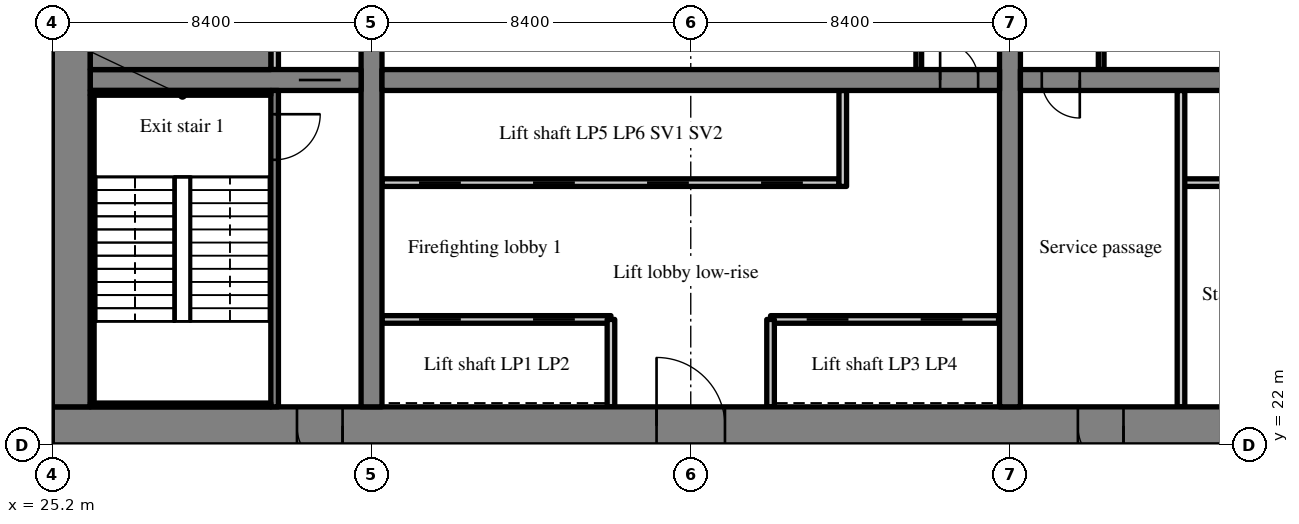
"""IFC4 building model, lengths in metres.
Left out: names, types, materials, properties, quantities, classifications, styles, units other than length and angle.
Written with IfcOpenShell. Run it as: python <this file> out.ifc"""

import sys

from ifc_helpers import new_model, si_unit, direction, frame, frame_2d, origin, place, context, subcontext, project, spatial, rectangle, extrude, source, transform, mapped, element, fill, save


model = new_model("IFC4")
c1 = context("Model", 3, precision=1e-05, world=origin(), true_north=direction((0.0, 1.0)))
c2 = subcontext(c1, "Body", "Model", "MODEL_VIEW")
j1 = project(units=[si_unit("LENGTHUNIT", "METRE"), si_unit("PLANEANGLEUNIT", "RADIAN")], contexts=[c1])
p1 = place(None, origin())
s1 = spatial("IfcSite", under=j1, at=p1, CompositionType="ELEMENT")
p2 = place(p1, origin())
s2 = spatial("IfcBuilding", under=s1, at=p2, CompositionType="ELEMENT")
p3 = place(p2, frame((0.0, 0.0, 46.8)))
s3 = spatial("IfcBuildingStorey", under=s2, at=p3, CompositionType="ELEMENT", Elevation=46.8)
m1 = source(origin(), c2, "Body", "SweptSolid", [
    extrude(rectangle(XDim=50.4, YDim=1.0, at=frame_2d((25.2, 0.0))), origin(), (0.0, 0.0, 1.0), 3.52),
])
p4 = place(p3, frame((25.2, 22.5, 0.0), z_axis=(0.0, 0.0, 1.0), x_axis=(1.0, 0.0, 0.0)))
e1 = element("IfcWall", 1, at=p4, inside=s3, PredefinedType="SHEAR", context=c2, shape_type="MappedRepresentation", body=[
    mapped(m1, transform((0.0, 0.0, 0.0), scale=1.0)),
])
m2 = source(origin(), c2, "Body", "SweptSolid", [
    extrude(rectangle(XDim=1.8, YDim=2.1, at=frame_2d((0.9, 1.05))), frame((0.0, 0.51, 0.0), z_axis=(0.0, -1.0, 0.0), x_axis=(1.0, 0.0, 0.0)), (0.0, 0.0, 1.0), 1.02),
])
p5 = place(p4, frame((15.9, 0.0, 0.0)))
e2 = element("IfcOpeningElement", 2, at=p5, cuts=e1, PredefinedType="OPENING", context=c2, shape_type="MappedRepresentation", body=[
    mapped(m2, transform((0.0, 0.0, 0.0), scale=1.0)),
])
m3 = source(origin(), c2, "Body", "SweptSolid", [
    extrude(rectangle(XDim=1.2, YDim=2.1, at=frame_2d((0.6, 1.05))), frame((0.0, 0.51, 0.0), z_axis=(0.0, -1.0, 0.0), x_axis=(1.0, 0.0, 0.0)), (0.0, 0.0, 1.0), 1.02),
])
p6 = place(p4, frame((26.987, 0.0, 0.0)))
e3 = element("IfcOpeningElement", 3, at=p6, cuts=e1, PredefinedType="OPENING", context=c2, shape_type="MappedRepresentation", body=[
    mapped(m3, transform((0.0, 0.0, 0.0), scale=1.0)),
])
m4 = source(origin(), c2, "Body", "SweptSolid", [
    extrude(rectangle(XDim=0.9, YDim=2.1, at=frame_2d((0.45, 1.05))), frame((0.0, 0.51, 0.0), z_axis=(0.0, -1.0, 0.0), x_axis=(1.0, 0.0, 0.0)), (0.0, 0.0, 1.0), 1.02),
])
p7 = place(p4, frame((33.75, 0.0, 0.0)))
e4 = element("IfcOpeningElement", 4, at=p7, cuts=e1, PredefinedType="OPENING", context=c2, shape_type="MappedRepresentation", body=[
    mapped(m4, transform((0.0, 0.0, 0.0), scale=1.0)),
])
p8 = place(p4, frame((30.75, 0.0, 0.0)))
e5 = element("IfcOpeningElement", 5, at=p8, cuts=e1, PredefinedType="OPENING", context=c2, shape_type="MappedRepresentation", body=[
    mapped(m4, transform((0.0, 0.0, 0.0), scale=1.0)),
])
p9 = place(p4, frame((38.262, 0.0, 0.0)))
e6 = element("IfcOpeningElement", 6, at=p9, cuts=e1, PredefinedType="OPENING", context=c2, shape_type="MappedRepresentation", body=[
    mapped(m4, transform((0.0, 0.0, 0.0), scale=1.0)),
])
p10 = place(p4, frame((6.438, 0.0, 0.0)))
e7 = element("IfcOpeningElement", 7, at=p10, cuts=e1, PredefinedType="OPENING", context=c2, shape_type="MappedRepresentation", body=[
    mapped(m3, transform((0.0, 0.0, 0.0), scale=1.0)),
])
p11 = place(p4, frame((47.725, 0.0, 0.0)))
e8 = element("IfcOpeningElement", 8, at=p11, cuts=e1, PredefinedType="OPENING", context=c2, shape_type="MappedRepresentation", body=[
    mapped(m3, transform((0.0, 0.0, 0.0), scale=1.0)),
])
m5 = source(origin(), c2, "Body", "SweptSolid", [
    extrude(rectangle(XDim=18.0, YDim=1.0, at=frame_2d((9.0, 0.0))), origin(), (0.0, 0.0, 1.0), 3.52),
])
p12 = place(p3, frame((25.7, 23.0, 0.0), z_axis=(0.0, 0.0, 1.0), x_axis=(0.0, 1.0, 0.0)))
e9 = element("IfcWall", 9, at=p12, inside=s3, PredefinedType="SHEAR", context=c2, shape_type="MappedRepresentation", body=[
    mapped(m5, transform((0.0, 0.0, 0.0), scale=1.0)),
])
m6 = source(origin(), c2, "Body", "SweptSolid", [
    extrude(rectangle(XDim=18.0, YDim=0.55, at=frame_2d((9.0, 0.0))), origin(), (0.0, 0.0, 1.0), 3.52),
])
p13 = place(p3, frame((33.6, 23.0, 0.0), z_axis=(0.0, 0.0, 1.0), x_axis=(0.0, 1.0, 0.0)))
e10 = element("IfcWall", 10, at=p13, inside=s3, PredefinedType="SHEAR", context=c2, shape_type="MappedRepresentation", body=[
    mapped(m6, transform((0.0, 0.0, 0.0), scale=1.0)),
])
m7 = source(origin(), c2, "Body", "SweptSolid", [
    extrude(rectangle(XDim=1.1, YDim=2.1, at=frame_2d((0.55, 1.05))), frame((0.0, 0.285, 0.0), z_axis=(0.0, -1.0, 0.0), x_axis=(1.0, 0.0, 0.0)), (0.0, 0.0, 1.0), 0.57),
])
p14 = place(p13, frame((12.45, 0.0, 0.0)))
e11 = element("IfcOpeningElement", 11, at=p14, cuts=e10, PredefinedType="OPENING", context=c2, shape_type="MappedRepresentation", body=[
    mapped(m7, transform((0.0, 0.0, 0.0), scale=1.0)),
])
p15 = place(p3, frame((50.4, 23.0, 0.0), z_axis=(0.0, 0.0, 1.0), x_axis=(0.0, 1.0, 0.0)))
e12 = element("IfcWall", 12, at=p15, inside=s3, PredefinedType="SHEAR", context=c2, shape_type="MappedRepresentation", body=[
    mapped(m6, transform((0.0, 0.0, 0.0), scale=1.0)),
])
p16 = place(p15, frame((12.45, 0.0, 0.0)))
e13 = element("IfcOpeningElement", 13, at=p16, cuts=e12, PredefinedType="OPENING", context=c2, shape_type="MappedRepresentation", body=[
    mapped(m7, transform((0.0, 0.0, 0.0), scale=1.0)),
])
m8 = source(origin(), c2, "Body", "SweptSolid", [
    extrude(rectangle(XDim=7.125, YDim=0.55, at=frame_2d((3.562, 0.0))), origin(), (0.0, 0.0, 1.0), 3.52),
])
p17 = place(p3, frame((26.2, 31.6, 0.0), z_axis=(0.0, 0.0, 1.0), x_axis=(1.0, 0.0, 0.0)))
e14 = element("IfcWall", 14, at=p17, inside=s3, PredefinedType="SHEAR", context=c2, shape_type="MappedRepresentation", body=[
    mapped(m8, transform((0.0, 0.0, 0.0), scale=1.0)),
])
p18 = place(p17, frame((5.488, 0.0, 0.0)))
e15 = element("IfcOpeningElement", 15, at=p18, cuts=e14, PredefinedType="OPENING", context=c2, shape_type="MappedRepresentation", body=[
    mapped(m7, transform((0.0, 0.0, 0.0), scale=1.0)),
])
m9 = source(origin(), c2, "Body", "SweptSolid", [
    extrude(rectangle(XDim=16.25, YDim=0.55, at=frame_2d((8.125, 0.0))), origin(), (0.0, 0.0, 1.0), 3.52),
])
p19 = place(p3, frame((33.875, 31.6, 0.0), z_axis=(0.0, 0.0, 1.0), x_axis=(1.0, 0.0, 0.0)))
e16 = element("IfcWall", 16, at=p19, inside=s3, PredefinedType="SHEAR", context=c2, shape_type="MappedRepresentation", body=[
    mapped(m9, transform((0.0, 0.0, 0.0), scale=1.0)),
])
m10 = source(origin(), c2, "Body", "SweptSolid", [
    extrude(rectangle(XDim=1.0, YDim=2.1, at=frame_2d((0.5, 1.05))), frame((0.0, 0.285, 0.0), z_axis=(0.0, -1.0, 0.0), x_axis=(1.0, 0.0, 0.0)), (0.0, 0.0, 1.0), 0.57),
])
p20 = place(p19, frame((14.687, 0.0, 0.0)))
e17 = element("IfcOpeningElement", 17, at=p20, cuts=e16, PredefinedType="OPENING", context=c2, shape_type="MappedRepresentation", body=[
    mapped(m10, transform((0.0, 0.0, 0.0), scale=1.0)),
])
p21 = place(p3, frame((50.675, 31.6, 0.0), z_axis=(0.0, 0.0, 1.0), x_axis=(1.0, 0.0, 0.0)))
e18 = element("IfcWall", 18, at=p21, inside=s3, PredefinedType="SHEAR", context=c2, shape_type="MappedRepresentation", body=[
    mapped(m9, transform((0.0, 0.0, 0.0), scale=1.0)),
])
p22 = place(p21, frame((0.562, 0.0, 0.0)))
e19 = element("IfcOpeningElement", 19, at=p22, cuts=e18, PredefinedType="OPENING", context=c2, shape_type="MappedRepresentation", body=[
    mapped(m10, transform((0.0, 0.0, 0.0), scale=1.0)),
])
m11 = source(origin(), c2, "Body", "SweptSolid", [
    extrude(rectangle(XDim=6.025, YDim=0.2, at=frame_2d((3.012, 0.0))), origin(), (0.0, 0.0, 1.0), 3.52),
])
p23 = place(p3, frame((33.875, 25.3, 0.0), z_axis=(0.0, 0.0, 1.0), x_axis=(1.0, 0.0, 0.0)))
e20 = element("IfcWall", 20, at=p23, inside=s3, PredefinedType="SOLIDWALL", context=c2, shape_type="MappedRepresentation", body=[
    mapped(m11, transform((0.0, 0.0, 0.0), scale=1.0)),
])
m12 = source(origin(), c2, "Body", "SweptSolid", [
    extrude(rectangle(XDim=1.1, YDim=2.1, at=frame_2d((0.55, 1.05))), frame((0.0, 0.11, 0.0), z_axis=(0.0, -1.0, 0.0), x_axis=(1.0, 0.0, 0.0)), (0.0, 0.0, 1.0), 0.22),
])
p24 = place(p23, frame((0.975, 0.0, 0.0)))
e21 = element("IfcOpeningElement", 21, at=p24, cuts=e20, PredefinedType="OPENING", context=c2, shape_type="MappedRepresentation", body=[
    mapped(m12, transform((0.0, 0.0, 0.0), scale=1.0)),
])
p25 = place(p23, frame((3.975, 0.0, 0.0)))
e22 = element("IfcOpeningElement", 22, at=p25, cuts=e20, PredefinedType="OPENING", context=c2, shape_type="MappedRepresentation", body=[
    mapped(m12, transform((0.0, 0.0, 0.0), scale=1.0)),
])
m13 = source(origin(), c2, "Body", "SweptSolid", [
    extrude(rectangle(XDim=6.0, YDim=0.2, at=frame_2d((3.0, 0.0))), origin(), (0.0, 0.0, 1.0), 3.52),
])
p26 = place(p3, frame((44.1, 25.3, 0.0), z_axis=(0.0, 0.0, 1.0), x_axis=(1.0, 0.0, 0.0)))
e23 = element("IfcWall", 23, at=p26, inside=s3, PredefinedType="SOLIDWALL", context=c2, shape_type="MappedRepresentation", body=[
    mapped(m13, transform((0.0, 0.0, 0.0), scale=1.0)),
])
p27 = place(p26, frame((0.95, 0.0, 0.0)))
e24 = element("IfcOpeningElement", 24, at=p27, cuts=e23, PredefinedType="OPENING", context=c2, shape_type="MappedRepresentation", body=[
    mapped(m12, transform((0.0, 0.0, 0.0), scale=1.0)),
])
p28 = place(p26, frame((3.95, 0.0, 0.0)))
e25 = element("IfcOpeningElement", 25, at=p28, cuts=e23, PredefinedType="OPENING", context=c2, shape_type="MappedRepresentation", body=[
    mapped(m12, transform((0.0, 0.0, 0.0), scale=1.0)),
])
m14 = source(origin(), c2, "Body", "SweptSolid", [
    extrude(rectangle(XDim=12.025, YDim=0.2, at=frame_2d((6.012, 0.0))), origin(), (0.0, 0.0, 1.0), 3.52),
])
p29 = place(p3, frame((33.875, 28.9, 0.0), z_axis=(0.0, 0.0, 1.0), x_axis=(1.0, 0.0, 0.0)))
e26 = element("IfcWall", 26, at=p29, inside=s3, PredefinedType="SOLIDWALL", context=c2, shape_type="MappedRepresentation", body=[
    mapped(m14, transform((0.0, 0.0, 0.0), scale=1.0)),
])
p30 = place(p29, frame((0.975, 0.0, 0.0)))
e27 = element("IfcOpeningElement", 27, at=p30, cuts=e26, PredefinedType="OPENING", context=c2, shape_type="MappedRepresentation", body=[
    mapped(m12, transform((0.0, 0.0, 0.0), scale=1.0)),
])
p31 = place(p29, frame((3.975, 0.0, 0.0)))
e28 = element("IfcOpeningElement", 28, at=p31, cuts=e26, PredefinedType="OPENING", context=c2, shape_type="MappedRepresentation", body=[
    mapped(m12, transform((0.0, 0.0, 0.0), scale=1.0)),
])
p32 = place(p29, frame((6.975, 0.0, 0.0)))
e29 = element("IfcOpeningElement", 29, at=p32, cuts=e26, PredefinedType="OPENING", context=c2, shape_type="MappedRepresentation", body=[
    mapped(m12, transform((0.0, 0.0, 0.0), scale=1.0)),
])
p33 = place(p29, frame((9.975, 0.0, 0.0)))
e30 = element("IfcOpeningElement", 30, at=p33, cuts=e26, PredefinedType="OPENING", context=c2, shape_type="MappedRepresentation", body=[
    mapped(m12, transform((0.0, 0.0, 0.0), scale=1.0)),
])
m15 = source(origin(), c2, "Body", "SweptSolid", [
    extrude(rectangle(XDim=2.3, YDim=0.2, at=frame_2d((1.15, 0.0))), origin(), (0.0, 0.0, 1.0), 3.52),
])
for number, where, z_axis, x_axis in (
    (31, (39.9, 23.0, 0.0), (0.0, 0.0, 1.0), (0.0, 1.0, 0.0)),
    (32, (44.1, 23.0, 0.0), (0.0, 0.0, 1.0), (0.0, 1.0, 0.0)),
):
    element("IfcWall", number, at=place(p3, frame(where, z_axis=z_axis, x_axis=x_axis)), inside=s3, PredefinedType="SOLIDWALL", context=c2, shape_type="MappedRepresentation", body=[
        mapped(m15, transform((0.0, 0.0, 0.0), scale=1.0)),
    ])
m16 = source(origin(), c2, "Body", "SweptSolid", [
    extrude(rectangle(XDim=2.525, YDim=0.2, at=frame_2d((1.262, 0.0))), origin(), (0.0, 0.0, 1.0), 3.52),
])
p34 = place(p3, frame((46.0, 28.8, 0.0), z_axis=(0.0, 0.0, 1.0), x_axis=(0.0, 1.0, 0.0)))
e33 = element("IfcWall", 33, at=p34, inside=s3, PredefinedType="SOLIDWALL", context=c2, shape_type="MappedRepresentation", body=[
    mapped(m16, transform((0.0, 0.0, 0.0), scale=1.0)),
])
m17 = source(origin(), c2, "Body", "SweptSolid", [
    extrude(rectangle(XDim=3.125, YDim=0.15, at=frame_2d((1.562, 0.0))), origin(), (0.0, 0.0, 1.0), 3.52),
])
p35 = place(p3, frame((48.0, 31.875, 0.0), z_axis=(0.0, 0.0, 1.0), x_axis=(0.0, 1.0, 0.0)))
e34 = element("IfcWall", 34, at=p35, inside=s3, PredefinedType="PARTITIONING", context=c2, shape_type="MappedRepresentation", body=[
    mapped(m17, transform((0.0, 0.0, 0.0), scale=1.0)),
])
p36 = place(p3, frame((60.9, 28.9, 0.0), z_axis=(0.0, 0.0, 1.0), x_axis=(-1.0, 0.0, 0.0)))
e35 = element("IfcWall", 35, at=p36, inside=s3, PredefinedType="SOLIDWALL", context=c2, shape_type="MappedRepresentation", body=[
    mapped(m13, transform((0.0, 0.0, 0.0), scale=1.0)),
])
m18 = source(origin(), c2, "Body", "SweptSolid", [
    extrude(rectangle(XDim=8.325, YDim=0.2, at=frame_2d((4.163, 0.0))), origin(), (0.0, 0.0, 1.0), 3.52),
])
p37 = place(p3, frame((54.9, 23.0, 0.0), z_axis=(0.0, 0.0, 1.0), x_axis=(0.0, 1.0, 0.0)))
e36 = element("IfcWall", 36, at=p37, inside=s3, PredefinedType="PARTITIONING", context=c2, shape_type="MappedRepresentation", body=[
    mapped(m18, transform((0.0, 0.0, 0.0), scale=1.0)),
])
p38 = place(p3, frame((52.8, 31.875, 0.0), z_axis=(0.0, 0.0, 1.0), x_axis=(0.0, 1.0, 0.0)))
e37 = element("IfcWall", 37, at=p38, inside=s3, PredefinedType="PARTITIONING", context=c2, shape_type="MappedRepresentation", body=[
    mapped(m17, transform((0.0, 0.0, 0.0), scale=1.0)),
])
m19 = source(origin(), c2, "Body", "SweptSolid", [
    extrude(rectangle(XDim=8.325, YDim=0.2, at=frame_2d((4.163, 0.0))), origin(), (0.0, 0.0, 1.0), 3.52),
])
p39 = place(p3, frame((31.05, 23.0, 0.0), z_axis=(0.0, 0.0, 1.0), x_axis=(0.0, 1.0, 0.0)))
e38 = element("IfcWall", 38, at=p39, inside=s3, PredefinedType="SOLIDWALL", context=c2, shape_type="MappedRepresentation", body=[
    mapped(m19, transform((0.0, 0.0, 0.0), scale=1.0)),
])
m20 = source(origin(), c2, "Body", "SweptSolid", [
    extrude(rectangle(XDim=1.2, YDim=2.1, at=frame_2d((0.6, 1.05))), frame((0.0, 0.11, 0.0), z_axis=(0.0, -1.0, 0.0), x_axis=(1.0, 0.0, 0.0)), (0.0, 0.0, 1.0), 0.22),
])
p40 = place(p39, frame((6.5, 0.0, 0.0)))
e39 = element("IfcOpeningElement", 39, at=p40, cuts=e38, PredefinedType="OPENING", context=c2, shape_type="MappedRepresentation", body=[
    mapped(m20, transform((0.0, 0.0, 0.0), scale=1.0)),
])
m21 = source(origin(), c2, "Body", "SweptSolid", [
    extrude(rectangle(XDim=1.725, YDim=0.2, at=frame_2d((0.863, 0.0))), origin(), (0.0, 0.0, 1.0), 3.52),
])
p41 = place(p3, frame((31.05, 31.875, 0.0), z_axis=(0.0, 0.0, 1.0), x_axis=(0.0, 1.0, 0.0)))
e40 = element("IfcWall", 40, at=p41, inside=s3, PredefinedType="SOLIDWALL", context=c2, shape_type="MappedRepresentation", body=[
    mapped(m21, transform((0.0, 0.0, 0.0), scale=1.0)),
])
m22 = source(origin(), c2, "Body", "SweptSolid", [
    extrude(rectangle(XDim=8.2, YDim=0.2, at=frame_2d((4.1, 0.0))), origin(), (0.0, 0.0, 1.0), 3.52),
])
p42 = place(p3, frame((17.0, 22.1, 0.0), z_axis=(0.0, 0.0, 1.0), x_axis=(1.0, 0.0, 0.0)))
e41 = element("IfcWall", 41, at=p42, inside=s3, PredefinedType="SOLIDWALL", context=c2, shape_type="MappedRepresentation", body=[
    mapped(m22, transform((0.0, 0.0, 0.0), scale=1.0)),
])
p43 = place(p42, frame((6.0, 0.0, 0.0)))
e42 = element("IfcOpeningElement", 42, at=p43, cuts=e41, PredefinedType="OPENING", context=c2, shape_type="MappedRepresentation", body=[
    mapped(m20, transform((0.0, 0.0, 0.0), scale=1.0)),
])
p44 = place(p3, frame((17.0, 30.4, 0.0), z_axis=(0.0, 0.0, 1.0), x_axis=(1.0, 0.0, 0.0)))
e43 = element("IfcWall", 43, at=p44, inside=s3, PredefinedType="SOLIDWALL", context=c2, shape_type="MappedRepresentation", body=[
    mapped(m22, transform((0.0, 0.0, 0.0), scale=1.0)),
])
m23 = source(origin(), c2, "Body", "SweptSolid", [
    extrude(rectangle(XDim=1.0, YDim=2.1, at=frame_2d((0.5, 1.05))), frame((0.0, 0.11, 0.0), z_axis=(0.0, -1.0, 0.0), x_axis=(1.0, 0.0, 0.0)), (0.0, 0.0, 1.0), 0.22),
])
p45 = place(p44, frame((6.1, 0.0, 0.0)))
e44 = element("IfcOpeningElement", 44, at=p45, cuts=e43, PredefinedType="OPENING", context=c2, shape_type="MappedRepresentation", body=[
    mapped(m23, transform((0.0, 0.0, 0.0), scale=1.0)),
])
m24 = source(origin(), c2, "Body", "SweptSolid", [
    extrude(rectangle(XDim=4.75, YDim=0.1, at=frame_2d((2.375, 0.0))), origin(), (0.0, 0.0, 1.0), 3.52),
])
p46 = place(p3, frame((26.2, 23.05, 0.0), z_axis=(0.0, 0.0, 1.0), x_axis=(1.0, 0.0, 0.0)))
e45 = element("IfcWall", 45, at=p46, inside=s3, PredefinedType="SOLIDWALL", context=c2, shape_type="MappedRepresentation", body=[
    mapped(m24, transform((0.0, 0.0, 0.0), scale=1.0)),
])
m25 = source(origin(), c2, "Body", "SweptSolid", [
    extrude(rectangle(XDim=4.75, YDim=0.125, at=frame_2d((2.375, 0.0))), origin(), (0.0, 0.0, 1.0), 3.52),
])
p47 = place(p3, frame((26.2, 31.262, 0.0), z_axis=(0.0, 0.0, 1.0), x_axis=(1.0, 0.0, 0.0)))
e46 = element("IfcWall", 46, at=p47, inside=s3, PredefinedType="SOLIDWALL", context=c2, shape_type="MappedRepresentation", body=[
    mapped(m25, transform((0.0, 0.0, 0.0), scale=1.0)),
])
m26 = source(origin(), c2, "Body", "SweptSolid", [
    extrude(rectangle(XDim=8.1, YDim=0.1, at=frame_2d((4.05, 0.0))), origin(), (0.0, 0.0, 1.0), 3.52),
])
p48 = place(p3, frame((26.25, 23.1, 0.0), z_axis=(0.0, 0.0, 1.0), x_axis=(0.0, 1.0, 0.0)))
e47 = element("IfcWall", 47, at=p48, inside=s3, PredefinedType="SOLIDWALL", context=c2, shape_type="MappedRepresentation", body=[
    mapped(m26, transform((0.0, 0.0, 0.0), scale=1.0)),
])
m27 = source(origin(), c2, "Body", "SweptSolid", [
    extrude(rectangle(XDim=4.75, YDim=0.925, at=frame_2d((2.375, 0.0))), origin(), (0.0, 0.0, 1.0), 3.52),
])
p49 = place(p3, frame((26.2, 32.337, 0.0), z_axis=(0.0, 0.0, 1.0), x_axis=(1.0, 0.0, 0.0)))
e48 = element("IfcWall", 48, at=p49, inside=s3, PredefinedType="SOLIDWALL", context=c2, shape_type="MappedRepresentation", body=[
    mapped(m27, transform((0.0, 0.0, 0.0), scale=1.0)),
])
m28 = source(origin(), c2, "Body", "SweptSolid", [
    extrude(rectangle(XDim=1.8, YDim=2.1, at=frame_2d((0.9, 1.05))), frame((0.0, 0.375, 0.0), z_axis=(0.0, -1.0, 0.0), x_axis=(1.0, 0.0, 0.0)), (0.0, 0.0, 1.0), 0.05),
])
p50 = place(p5, origin())
e49 = element("IfcDoor", 49, at=p50, inside=s3, OperationType="DOUBLE_DOOR_SINGLE_SWING", PredefinedType="DOOR", context=c2, shape_type="MappedRepresentation", body=[
    mapped(m28, transform((0.0, 0.0, 0.0), scale=1.0)),
])
fill(e2, e49)
m29 = source(origin(), c2, "Body", "SweptSolid", [
    extrude(rectangle(XDim=1.0, YDim=2.1, at=frame_2d((0.5, 1.05))), frame((0.0, 0.025, 0.0), z_axis=(0.0, -1.0, 0.0), x_axis=(1.0, 0.0, 0.0)), (0.0, 0.0, 1.0), 0.05),
])
p51 = place(p20, origin())
e50 = element("IfcDoor", 50, at=p51, inside=s3, OperationType="SINGLE_SWING_LEFT", PredefinedType="DOOR", context=c2, shape_type="MappedRepresentation", body=[
    mapped(m29, transform((0.0, 0.0, 0.0), scale=1.0)),
])
fill(e17, e50)
m30 = source(origin(), c2, "Body", "SweptSolid", [
    extrude(rectangle(XDim=1.1, YDim=2.1, at=frame_2d((0.55, 1.05))), frame((0.0, 0.025, 0.0), z_axis=(0.0, -1.0, 0.0), x_axis=(1.0, 0.0, 0.0)), (0.0, 0.0, 1.0), 0.05),
])
p52 = place(p24, origin())
e51 = element("IfcDoor", 51, at=p52, inside=s3, OperationType="SLIDING_TO_LEFT", PredefinedType="DOOR", context=c2, shape_type="MappedRepresentation", body=[
    mapped(m30, transform((0.0, 0.0, 0.0), scale=1.0)),
])
fill(e21, e51)
p53 = place(p25, origin())
e52 = element("IfcDoor", 52, at=p53, inside=s3, OperationType="SLIDING_TO_RIGHT", PredefinedType="DOOR", context=c2, shape_type="MappedRepresentation", body=[
    mapped(m30, transform((0.0, 0.0, 0.0), scale=1.0)),
])
fill(e22, e52)
p54 = place(p27, origin())
e53 = element("IfcDoor", 53, at=p54, inside=s3, OperationType="SLIDING_TO_LEFT", PredefinedType="DOOR", context=c2, shape_type="MappedRepresentation", body=[
    mapped(m30, transform((0.0, 0.0, 0.0), scale=1.0)),
])
fill(e24, e53)
p55 = place(p28, origin())
e54 = element("IfcDoor", 54, at=p55, inside=s3, OperationType="SLIDING_TO_RIGHT", PredefinedType="DOOR", context=c2, shape_type="MappedRepresentation", body=[
    mapped(m30, transform((0.0, 0.0, 0.0), scale=1.0)),
])
fill(e25, e54)
p56 = place(p30, origin())
e55 = element("IfcDoor", 55, at=p56, inside=s3, OperationType="SLIDING_TO_LEFT", PredefinedType="DOOR", context=c2, shape_type="MappedRepresentation", body=[
    mapped(m30, transform((0.0, 0.0, 0.0), scale=1.0)),
])
fill(e27, e55)
p57 = place(p31, origin())
e56 = element("IfcDoor", 56, at=p57, inside=s3, OperationType="SLIDING_TO_RIGHT", PredefinedType="DOOR", context=c2, shape_type="MappedRepresentation", body=[
    mapped(m30, transform((0.0, 0.0, 0.0), scale=1.0)),
])
fill(e28, e56)
p58 = place(p32, origin())
e57 = element("IfcDoor", 57, at=p58, inside=s3, OperationType="SLIDING_TO_LEFT", PredefinedType="DOOR", context=c2, shape_type="MappedRepresentation", body=[
    mapped(m30, transform((0.0, 0.0, 0.0), scale=1.0)),
])
fill(e29, e57)
p59 = place(p33, origin())
e58 = element("IfcDoor", 58, at=p59, inside=s3, OperationType="SLIDING_TO_RIGHT", PredefinedType="DOOR", context=c2, shape_type="MappedRepresentation", body=[
    mapped(m30, transform((0.0, 0.0, 0.0), scale=1.0)),
])
fill(e30, e58)
m31 = source(origin(), c2, "Body", "SweptSolid", [
    extrude(rectangle(XDim=1.2, YDim=2.1, at=frame_2d((0.6, 1.05))), frame((0.0, 0.375, 0.0), z_axis=(0.0, -1.0, 0.0), x_axis=(1.0, 0.0, 0.0)), (0.0, 0.0, 1.0), 0.05),
])
p60 = place(p6, origin())
e59 = element("IfcDoor", 59, at=p60, inside=s3, OperationType="SINGLE_SWING_RIGHT", PredefinedType="DOOR", context=c2, shape_type="MappedRepresentation", body=[
    mapped(m31, transform((0.0, 0.0, 0.0), scale=1.0)),
])
fill(e3, e59)
p61 = place(p22, origin())
e60 = element("IfcDoor", 60, at=p61, inside=s3, OperationType="SINGLE_SWING_RIGHT", PredefinedType="DOOR", context=c2, shape_type="MappedRepresentation", body=[
    mapped(m29, transform((0.0, 0.0, 0.0), scale=1.0)),
])
fill(e19, e60)
m32 = source(origin(), c2, "Body", "SweptSolid", [
    extrude(rectangle(XDim=1.2, YDim=2.1, at=frame_2d((0.6, 1.05))), frame((0.0, 0.025, 0.0), z_axis=(0.0, -1.0, 0.0), x_axis=(1.0, 0.0, 0.0)), (0.0, 0.0, 1.0), 0.05),
])
p62 = place(p40, origin())
e61 = element("IfcDoor", 61, at=p62, inside=s3, OperationType="SINGLE_SWING_RIGHT", PredefinedType="DOOR", context=c2, shape_type="MappedRepresentation", body=[
    mapped(m32, transform((0.0, 0.0, 0.0), scale=1.0)),
])
fill(e39, e61)
p63 = place(p10, origin())
e62 = element("IfcDoor", 62, at=p63, inside=s3, OperationType="SINGLE_SWING_RIGHT", PredefinedType="DOOR", context=c2, shape_type="MappedRepresentation", body=[
    mapped(m31, transform((0.0, 0.0, 0.0), scale=1.0)),
])
fill(e7, e62)
p64 = place(p18, origin())
e63 = element("IfcDoor", 63, at=p64, inside=s3, OperationType="SLIDING_TO_LEFT", PredefinedType="DOOR", context=c2, shape_type="MappedRepresentation", body=[
    mapped(m30, transform((0.0, 0.0, 0.0), scale=1.0)),
])
fill(e15, e63)
save(model, sys.argv[1])
